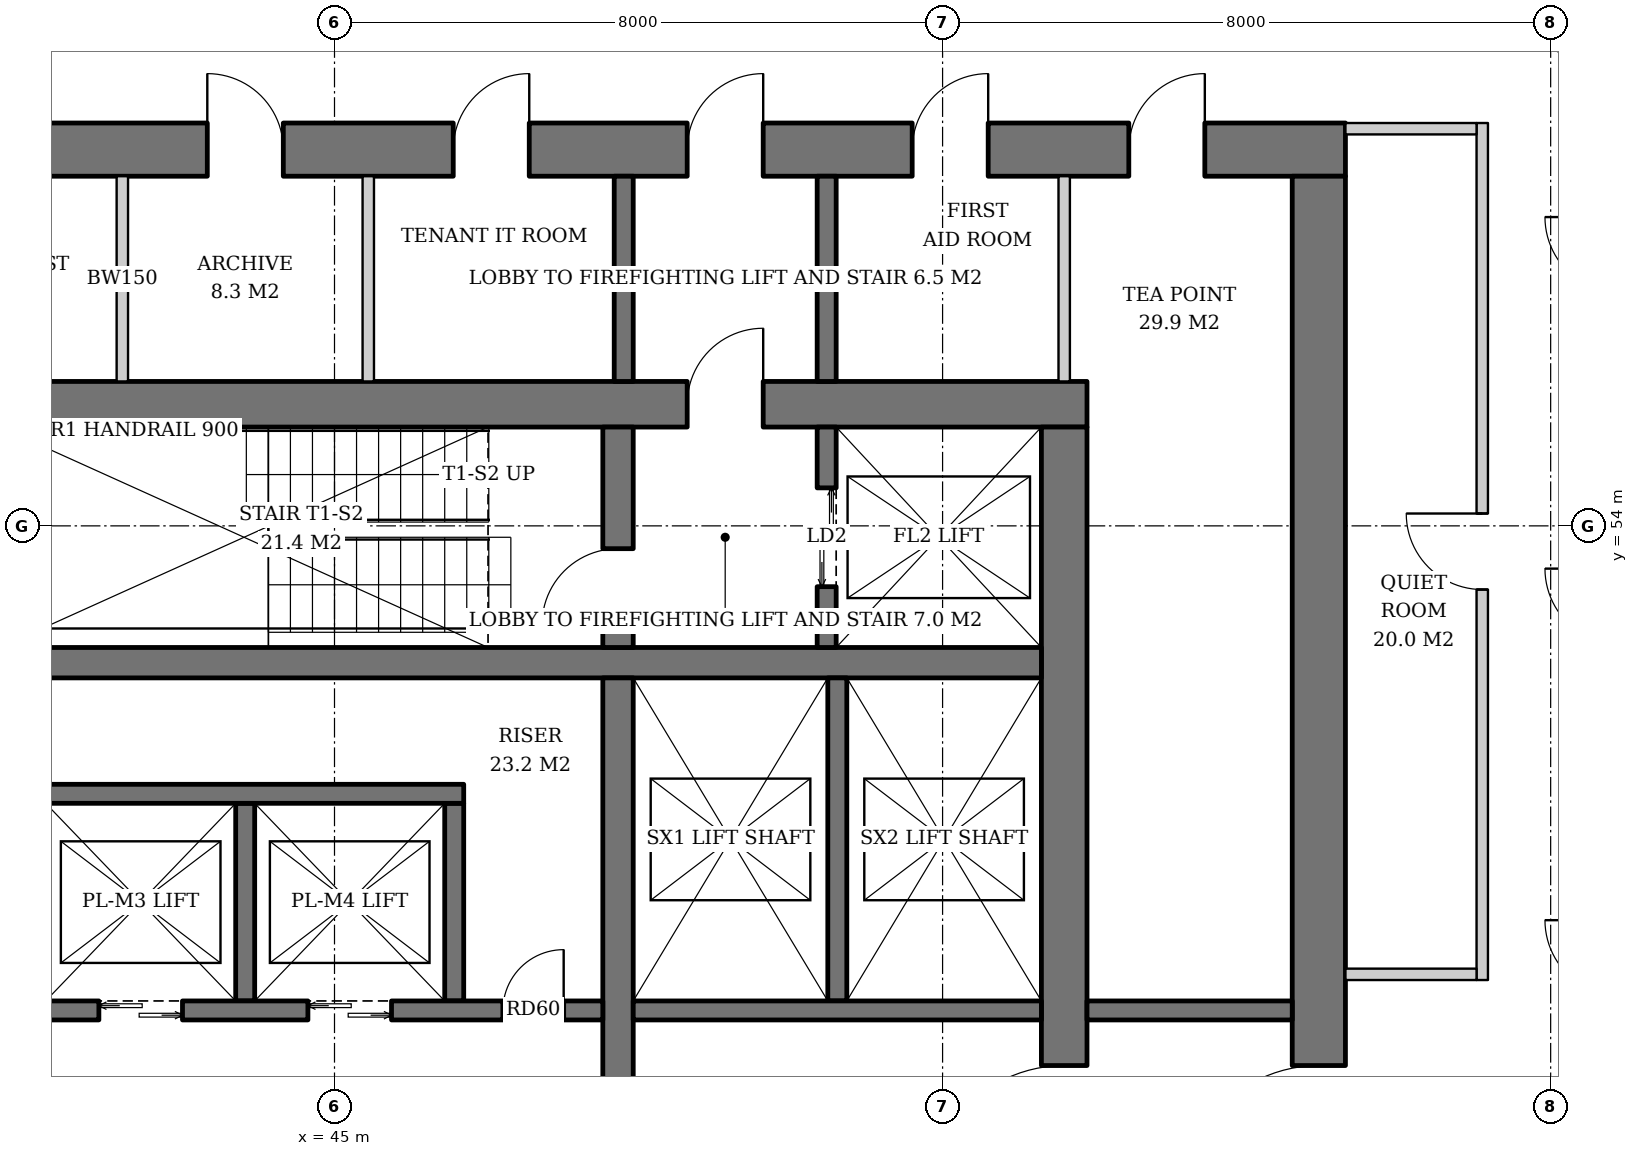
"""IFC4 building model, lengths in metres.
Left out: names, types, materials, properties, quantities, classifications, styles, units other than length and angle.
Written with IfcOpenShell. Run it as: python <this file> out.ifc"""

import sys

from ifc_helpers import new_model, si_unit, direction, frame, frame_2d, origin, origin_2d, place, context, subcontext, project, spatial, rectangle, extrude, element, fill, save


model = new_model("IFC4")
c1 = context("Model", 3, precision=1e-05, world=origin(), true_north=direction((0.0, 1.0)))
c2 = subcontext(c1, "Body", "Model", "MODEL_VIEW")
j1 = project(units=[si_unit("LENGTHUNIT", "METRE"), si_unit("PLANEANGLEUNIT", "RADIAN")], contexts=[c1])
p1 = place(None, origin())
s1 = spatial("IfcSite", under=j1, at=p1, CompositionType="ELEMENT")
p2 = place(p1, origin())
s2 = spatial("IfcBuilding", under=s1, at=p2, CompositionType="ELEMENT")
p3 = place(p2, frame((0.0, 0.0, 138.8)))
s3 = spatial("IfcBuildingStorey", under=s2, at=p3, CompositionType="ELEMENT", Elevation=138.8)
p4 = place(p3, frame((61.136, 62.136, 0.0), z_axis=(-0.031898107953, -0.031898107953, 0.998981992539), x_axis=(0.707106781187, -0.707106781187, 0.0)))
e1 = element("IfcColumn", 1, at=p4, inside=s3, PredefinedType="COLUMN", context=c2, shape_type="SweptSolid", body=[
    extrude(rectangle(XDim=2.6, YDim=2.6, at=origin_2d()), origin(), (0.0, 0.0, 1.0), 3.804),
])
p5 = place(p3, frame((35.1, 55.6, 0.0), z_axis=(0.0, 0.0, 1.0), x_axis=(1.0, 0.0, 0.0)))
e2 = element("IfcWall", 2, at=p5, inside=s3, PredefinedType="SHEAR", context=c2, shape_type="SweptSolid", body=[
    extrude(rectangle(XDim=19.8, YDim=0.6, at=frame_2d((9.9, 0.0))), origin(), (0.0, 0.0, 1.0), 3.8),
])
p6 = place(p5, frame((14.54, 0.0, 0.0)))
e3 = element("IfcOpeningElement", 3, at=p6, cuts=e2, PredefinedType="OPENING", context=c2, shape_type="SweptSolid", body=[
    extrude(rectangle(XDim=1.0, YDim=2.1, at=frame_2d((0.5, 1.05))), frame((0.0, 0.31, 0.0), z_axis=(0.0, -1.0, 0.0), x_axis=(1.0, 0.0, 0.0)), (0.0, 0.0, 1.0), 0.62),
])
p7 = place(p5, frame((2.425, 0.0, 0.0)))
e4 = element("IfcOpeningElement", 4, at=p7, cuts=e2, PredefinedType="OPENING", context=c2, shape_type="SweptSolid", body=[
    extrude(rectangle(XDim=1.0, YDim=2.1, at=frame_2d((0.5, 1.05))), frame((0.0, 0.31, 0.0), z_axis=(0.0, -1.0, 0.0), x_axis=(1.0, 0.0, 0.0)), (0.0, 0.0, 1.0), 0.62),
])
p8 = place(p3, frame((54.6, 36.7, 0.0), z_axis=(0.0, 0.0, 1.0), x_axis=(0.0, 1.0, 0.0)))
e5 = element("IfcWall", 5, at=p8, inside=s3, PredefinedType="SHEAR", context=c2, shape_type="SweptSolid", body=[
    extrude(rectangle(XDim=18.6, YDim=0.6, at=frame_2d((9.3, 0.0))), origin(), (0.0, 0.0, 1.0), 3.8),
])
p9 = place(p8, frame((8.4, 0.0, 0.0)))
e6 = element("IfcOpeningElement", 6, at=p9, cuts=e5, PredefinedType="OPENING", context=c2, shape_type="SweptSolid", body=[
    extrude(rectangle(XDim=1.8, YDim=2.4, at=frame_2d((0.9, 1.2))), frame((0.0, 0.31, 0.0), z_axis=(0.0, -1.0, 0.0), x_axis=(1.0, 0.0, 0.0)), (0.0, 0.0, 1.0), 0.62),
])
p10 = place(p3, frame((31.7, 58.95, 0.0), z_axis=(0.0, 0.0, 1.0), x_axis=(1.0, 0.0, 0.0)))
e7 = element("IfcWall", 7, at=p10, inside=s3, PredefinedType="SHEAR", context=c2, shape_type="SweptSolid", body=[
    extrude(rectangle(XDim=26.6, YDim=0.7, at=frame_2d((13.3, 0.0))), origin(), (0.0, 0.0, 1.0), 3.8),
])
p11 = place(p10, frame((17.94, 0.0, 0.0)))
e8 = element("IfcOpeningElement", 8, at=p11, cuts=e7, PredefinedType="OPENING", context=c2, shape_type="SweptSolid", body=[
    extrude(rectangle(XDim=1.0, YDim=2.1, at=frame_2d((0.5, 1.05))), frame((0.0, 0.36, 0.0), z_axis=(0.0, -1.0, 0.0), x_axis=(1.0, 0.0, 0.0)), (0.0, 0.0, 1.0), 0.72),
])
p12 = place(p10, frame((5.825, 0.0, 0.0)))
e9 = element("IfcOpeningElement", 9, at=p12, cuts=e7, PredefinedType="OPENING", context=c2, shape_type="SweptSolid", body=[
    extrude(rectangle(XDim=1.0, YDim=2.1, at=frame_2d((0.5, 1.05))), frame((0.0, 0.36, 0.0), z_axis=(0.0, -1.0, 0.0), x_axis=(1.0, 0.0, 0.0)), (0.0, 0.0, 1.0), 0.72),
])
p13 = place(p10, frame((1.85, 0.0, 0.0)))
e10 = element("IfcOpeningElement", 10, at=p13, cuts=e7, PredefinedType="OPENING", context=c2, shape_type="SweptSolid", body=[
    extrude(rectangle(XDim=1.0, YDim=2.1, at=frame_2d((0.5, 1.05))), frame((0.0, 0.36, 0.0), z_axis=(0.0, -1.0, 0.0), x_axis=(1.0, 0.0, 0.0)), (0.0, 0.0, 1.0), 0.72),
])
p14 = place(p10, frame((4.115, 0.0, 0.0)))
e11 = element("IfcOpeningElement", 11, at=p14, cuts=e7, PredefinedType="OPENING", context=c2, shape_type="SweptSolid", body=[
    extrude(rectangle(XDim=1.0, YDim=2.1, at=frame_2d((0.5, 1.05))), frame((0.0, 0.36, 0.0), z_axis=(0.0, -1.0, 0.0), x_axis=(1.0, 0.0, 0.0)), (0.0, 0.0, 1.0), 0.72),
])
p15 = place(p10, frame((8.342, 0.0, 0.0)))
e12 = element("IfcOpeningElement", 12, at=p15, cuts=e7, PredefinedType="OPENING", context=c2, shape_type="SweptSolid", body=[
    extrude(rectangle(XDim=1.0, YDim=2.1, at=frame_2d((0.5, 1.05))), frame((0.0, 0.36, 0.0), z_axis=(0.0, -1.0, 0.0), x_axis=(1.0, 0.0, 0.0)), (0.0, 0.0, 1.0), 0.72),
])
p16 = place(p10, frame((11.626, 0.0, 0.0)))
e13 = element("IfcOpeningElement", 13, at=p16, cuts=e7, PredefinedType="OPENING", context=c2, shape_type="SweptSolid", body=[
    extrude(rectangle(XDim=1.0, YDim=2.1, at=frame_2d((0.5, 1.05))), frame((0.0, 0.36, 0.0), z_axis=(0.0, -1.0, 0.0), x_axis=(1.0, 0.0, 0.0)), (0.0, 0.0, 1.0), 0.72),
])
p17 = place(p10, frame((14.862, 0.0, 0.0)))
e14 = element("IfcOpeningElement", 14, at=p17, cuts=e7, PredefinedType="OPENING", context=c2, shape_type="SweptSolid", body=[
    extrude(rectangle(XDim=1.0, YDim=2.1, at=frame_2d((0.5, 1.05))), frame((0.0, 0.36, 0.0), z_axis=(0.0, -1.0, 0.0), x_axis=(1.0, 0.0, 0.0)), (0.0, 0.0, 1.0), 0.72),
])
p18 = place(p10, frame((20.9, 0.0, 0.0)))
e15 = element("IfcOpeningElement", 15, at=p18, cuts=e7, PredefinedType="OPENING", context=c2, shape_type="SweptSolid", body=[
    extrude(rectangle(XDim=1.0, YDim=2.1, at=frame_2d((0.5, 1.05))), frame((0.0, 0.36, 0.0), z_axis=(0.0, -1.0, 0.0), x_axis=(1.0, 0.0, 0.0)), (0.0, 0.0, 1.0), 0.72),
])
p19 = place(p10, frame((23.75, 0.0, 0.0)))
e16 = element("IfcOpeningElement", 16, at=p19, cuts=e7, PredefinedType="OPENING", context=c2, shape_type="SweptSolid", body=[
    extrude(rectangle(XDim=1.0, YDim=2.1, at=frame_2d((0.5, 1.05))), frame((0.0, 0.36, 0.0), z_axis=(0.0, -1.0, 0.0), x_axis=(1.0, 0.0, 0.0)), (0.0, 0.0, 1.0), 0.72),
])
p20 = place(p3, frame((57.95, 33.4, 0.0), z_axis=(0.0, 0.0, 1.0), x_axis=(0.0, 1.0, 0.0)))
e17 = element("IfcWall", 17, at=p20, inside=s3, PredefinedType="SHEAR", context=c2, shape_type="SweptSolid", body=[
    extrude(rectangle(XDim=25.2, YDim=0.7, at=frame_2d((12.6, 0.0))), origin(), (0.0, 0.0, 1.0), 3.8),
])
p21 = place(p20, frame((11.7, 0.0, 0.0)))
e18 = element("IfcOpeningElement", 18, at=p21, cuts=e17, PredefinedType="OPENING", context=c2, shape_type="SweptSolid", body=[
    extrude(rectangle(XDim=1.8, YDim=2.4, at=frame_2d((0.9, 1.2))), frame((0.0, 0.36, 0.0), z_axis=(0.0, -1.0, 0.0), x_axis=(1.0, 0.0, 0.0)), (0.0, 0.0, 1.0), 0.72),
])
p22 = place(p3, frame((35.7, 52.2, 0.0), z_axis=(0.0, 0.0, 1.0), x_axis=(1.0, 0.0, 0.0)))
e19 = element("IfcWall", 19, at=p22, inside=s3, PredefinedType="SHEAR", context=c2, shape_type="SweptSolid", body=[
    extrude(rectangle(XDim=18.6, YDim=0.4, at=frame_2d((9.3, 0.0))), origin(), (0.0, 0.0, 1.0), 3.8),
])
p23 = place(p3, frame((48.73, 40.0, 0.0), z_axis=(0.0, 0.0, 1.0), x_axis=(0.0, 1.0, 0.0)))
e20 = element("IfcWall", 20, at=p23, inside=s3, PredefinedType="SHEAR", context=c2, shape_type="SweptSolid", body=[
    extrude(rectangle(XDim=12.0, YDim=0.4, at=frame_2d((6.0, 0.0))), origin(), (0.0, 0.0, 1.0), 3.8),
])
p24 = place(p3, frame((48.73, 52.4, 0.0), z_axis=(0.0, 0.0, 1.0), x_axis=(0.0, 1.0, 0.0)))
e21 = element("IfcWall", 21, at=p24, inside=s3, PredefinedType="SHEAR", context=c2, shape_type="SweptSolid", body=[
    extrude(rectangle(XDim=2.9, YDim=0.4, at=frame_2d((1.45, 0.0))), origin(), (0.0, 0.0, 1.0), 3.8),
])
p25 = place(p24, frame((0.3, 0.0, 0.0)))
e22 = element("IfcOpeningElement", 22, at=p25, cuts=e21, PredefinedType="OPENING", context=c2, shape_type="SweptSolid", body=[
    extrude(rectangle(XDim=1.0, YDim=2.1, at=frame_2d((0.5, 1.05))), frame((0.0, 0.21, 0.0), z_axis=(0.0, -1.0, 0.0), x_axis=(1.0, 0.0, 0.0)), (0.0, 0.0, 1.0), 0.42),
])
p26 = place(p3, frame((51.475, 52.4, 0.0), z_axis=(0.0, 0.0, 1.0), x_axis=(0.0, 1.0, 0.0)))
e23 = element("IfcWall", 23, at=p26, inside=s3, PredefinedType="SHEAR", context=c2, shape_type="SweptSolid", body=[
    extrude(rectangle(XDim=2.9, YDim=0.25, at=frame_2d((1.45, 0.0))), origin(), (0.0, 0.0, 1.0), 3.8),
])
p27 = place(p26, frame((0.8, 0.0, 0.0)))
e24 = element("IfcOpeningElement", 24, at=p27, cuts=e23, PredefinedType="OPENING", context=c2, shape_type="SweptSolid", body=[
    extrude(rectangle(XDim=1.3, YDim=2.2, at=frame_2d((0.65, 1.1))), frame((0.0, 0.135, 0.0), z_axis=(0.0, -1.0, 0.0), x_axis=(1.0, 0.0, 0.0)), (0.0, 0.0, 1.0), 0.27),
])
for number, where, z_axis, x_axis in (
    (25, (43.825, 47.75, 0.0), (0.0, 0.0, 1.0), (0.0, 1.0, 0.0)),
    (26, (46.575, 47.75, 0.0), (0.0, 0.0, 1.0), (0.0, 1.0, 0.0)),
):
    element("IfcWall", number, at=place(p3, frame(where, z_axis=z_axis, x_axis=x_axis)), inside=s3, PredefinedType="SHEAR", context=c2, shape_type="SweptSolid", body=[
        extrude(rectangle(XDim=2.6, YDim=0.25, at=frame_2d((1.3, 0.0))), origin(), (0.0, 0.0, 1.0), 3.8),
    ])
p28 = place(p3, frame((35.7, 50.475, 0.0), z_axis=(0.0, 0.0, 1.0), x_axis=(1.0, 0.0, 0.0)))
e27 = element("IfcWall", 27, at=p28, inside=s3, PredefinedType="SHEAR", context=c2, shape_type="SweptSolid", body=[
    extrude(rectangle(XDim=11.0, YDim=0.25, at=frame_2d((5.5, 0.0))), origin(), (0.0, 0.0, 1.0), 3.8),
])
p29 = place(p3, frame((35.7, 47.625, 0.0), z_axis=(0.0, 0.0, 1.0), x_axis=(1.0, 0.0, 0.0)))
e28 = element("IfcWall", 28, at=p29, inside=s3, PredefinedType="SHEAR", context=c2, shape_type="SweptSolid", body=[
    extrude(rectangle(XDim=12.83, YDim=0.25, at=frame_2d((6.415, 0.0))), origin(), (0.0, 0.0, 1.0), 3.8),
])
p30 = place(p29, frame((0.7, 0.0, 0.0)))
e29 = element("IfcOpeningElement", 29, at=p30, cuts=e28, PredefinedType="OPENING", context=c2, shape_type="SweptSolid", body=[
    extrude(rectangle(XDim=1.1, YDim=2.2, at=frame_2d((0.55, 1.1))), frame((0.0, 0.135, 0.0), z_axis=(0.0, -1.0, 0.0), x_axis=(1.0, 0.0, 0.0)), (0.0, 0.0, 1.0), 0.27),
])
p31 = place(p29, frame((3.45, 0.0, 0.0)))
e30 = element("IfcOpeningElement", 30, at=p31, cuts=e28, PredefinedType="OPENING", context=c2, shape_type="SweptSolid", body=[
    extrude(rectangle(XDim=1.1, YDim=2.2, at=frame_2d((0.55, 1.1))), frame((0.0, 0.135, 0.0), z_axis=(0.0, -1.0, 0.0), x_axis=(1.0, 0.0, 0.0)), (0.0, 0.0, 1.0), 0.27),
])
p32 = place(p29, frame((6.2, 0.0, 0.0)))
e31 = element("IfcOpeningElement", 31, at=p32, cuts=e28, PredefinedType="OPENING", context=c2, shape_type="SweptSolid", body=[
    extrude(rectangle(XDim=1.1, YDim=2.2, at=frame_2d((0.55, 1.1))), frame((0.0, 0.135, 0.0), z_axis=(0.0, -1.0, 0.0), x_axis=(1.0, 0.0, 0.0)), (0.0, 0.0, 1.0), 0.27),
])
p33 = place(p29, frame((8.95, 0.0, 0.0)))
e32 = element("IfcOpeningElement", 32, at=p33, cuts=e28, PredefinedType="OPENING", context=c2, shape_type="SweptSolid", body=[
    extrude(rectangle(XDim=1.1, YDim=2.2, at=frame_2d((0.55, 1.1))), frame((0.0, 0.135, 0.0), z_axis=(0.0, -1.0, 0.0), x_axis=(1.0, 0.0, 0.0)), (0.0, 0.0, 1.0), 0.27),
])
p34 = place(p29, frame((11.515, 0.0, 0.0)))
e33 = element("IfcOpeningElement", 33, at=p34, cuts=e28, PredefinedType="OPENING", context=c2, shape_type="SweptSolid", body=[
    extrude(rectangle(XDim=0.8, YDim=2.0, at=frame_2d((0.4, 1.0))), frame((0.0, 0.135, 0.0), z_axis=(0.0, -1.0, 0.0), x_axis=(1.0, 0.0, 0.0)), (0.0, 0.0, 1.0), 0.27),
])
p35 = place(p3, frame((51.615, 47.75, 0.0), z_axis=(0.0, 0.0, 1.0), x_axis=(0.0, 1.0, 0.0)))
e34 = element("IfcWall", 34, at=p35, inside=s3, PredefinedType="SHEAR", context=c2, shape_type="SweptSolid", body=[
    extrude(rectangle(XDim=4.25, YDim=0.25, at=frame_2d((2.125, 0.0))), origin(), (0.0, 0.0, 1.0), 3.8),
])
p36 = place(p3, frame((48.93, 47.625, 0.0), z_axis=(0.0, 0.0, 1.0), x_axis=(1.0, 0.0, 0.0)))
e35 = element("IfcWall", 35, at=p36, inside=s3, PredefinedType="SHEAR", context=c2, shape_type="SweptSolid", body=[
    extrude(rectangle(XDim=5.37, YDim=0.25, at=frame_2d((2.685, 0.0))), origin(), (0.0, 0.0, 1.0), 3.8),
])
for number, where, z_axis, x_axis in (
    (36, (48.805, 55.9, 0.0), (0.0, 0.0, 1.0), (0.0, 1.0, 0.0)),
    (37, (51.475, 55.9, 0.0), (0.0, 0.0, 1.0), (0.0, 1.0, 0.0)),
    (38, (54.9, 47.625, 0.0), (0.0, 0.0, 1.0), (1.0, 0.0, 0.0)),
):
    element("IfcWall", number, at=place(p3, frame(where, z_axis=z_axis, x_axis=x_axis)), inside=s3, PredefinedType="SOLIDWALL", context=c2, shape_type="SweptSolid", body=[
        extrude(rectangle(XDim=2.7, YDim=0.25, at=frame_2d((1.35, 0.0))), origin(), (0.0, 0.0, 1.0), 3.62),
    ])
for number, where, z_axis, x_axis in (
    (39, (42.209, 55.9, 0.0), (0.0, 0.0, 1.0), (0.0, 1.0, 0.0)),
    (40, (45.444, 55.9, 0.0), (0.0, 0.0, 1.0), (0.0, 1.0, 0.0)),
    (41, (54.6, 55.9, 0.0), (0.0, 0.0, 1.0), (0.0, 1.0, 0.0)),
):
    element("IfcWall", number, at=place(p3, frame(where, z_axis=z_axis, x_axis=x_axis)), inside=s3, PredefinedType="SOLIDWALL", context=c2, shape_type="SweptSolid", body=[
        extrude(rectangle(XDim=2.7, YDim=0.15, at=frame_2d((1.35, 0.0))), origin(), (0.0, 0.0, 1.0), 3.62),
    ])
p37 = place(p3, frame((60.1, 48.025, 0.0), z_axis=(0.0, 0.0, 1.0), x_axis=(0.0, 1.0, 0.0)))
e42 = element("IfcWall", 42, at=p37, inside=s3, PredefinedType="PARTITIONING", context=c2, shape_type="SweptSolid", body=[
    extrude(rectangle(XDim=11.275, YDim=0.15, at=frame_2d((5.638, 0.0))), origin(), (0.0, 0.0, 1.0), 2.806),
])
p38 = place(p37, frame((5.137, 0.0, 0.0)))
e43 = element("IfcOpeningElement", 43, at=p38, cuts=e42, PredefinedType="OPENING", context=c2, shape_type="SweptSolid", body=[
    extrude(rectangle(XDim=1.0, YDim=2.1, at=frame_2d((0.5, 1.05))), frame((0.0, 0.085, 0.0), z_axis=(0.0, -1.0, 0.0), x_axis=(1.0, 0.0, 0.0)), (0.0, 0.0, 1.0), 0.17),
])
for number, where, z_axis, x_axis in (
    (44, (58.3, 48.1, 0.0), (0.0, 0.0, 1.0), (1.0, 0.0, 0.0)),
    (45, (58.3, 59.225, 0.0), (0.0, 0.0, 1.0), (1.0, 0.0, 0.0)),
):
    element("IfcWall", number, at=place(p3, frame(where, z_axis=z_axis, x_axis=x_axis)), inside=s3, PredefinedType="PARTITIONING", context=c2, shape_type="SweptSolid", body=[
        extrude(rectangle(XDim=1.725, YDim=0.15, at=frame_2d((0.862, 0.0))), origin(), (0.0, 0.0, 1.0), 3.62),
    ])
p39 = place(p27, origin())
e46 = element("IfcDoor", 46, at=p39, inside=s3, OperationType="DOUBLE_DOOR_SLIDING", PredefinedType="DOOR", context=c2, shape_type="SweptSolid", body=[
    extrude(rectangle(XDim=1.3, YDim=2.2, at=frame_2d((0.65, 1.1))), frame((0.0, 0.025, 0.0), z_axis=(0.0, -1.0, 0.0), x_axis=(1.0, 0.0, 0.0)), (0.0, 0.0, 1.0), 0.05),
])
fill(e24, e46)
p40 = place(p32, origin())
e47 = element("IfcDoor", 47, at=p40, inside=s3, OperationType="DOUBLE_DOOR_SLIDING", PredefinedType="DOOR", context=c2, shape_type="SweptSolid", body=[
    extrude(rectangle(XDim=1.1, YDim=2.2, at=frame_2d((0.55, 1.1))), frame((0.0, 0.025, 0.0), z_axis=(0.0, -1.0, 0.0), x_axis=(1.0, 0.0, 0.0)), (0.0, 0.0, 1.0), 0.05),
])
fill(e31, e47)
p41 = place(p33, origin())
e48 = element("IfcDoor", 48, at=p41, inside=s3, OperationType="DOUBLE_DOOR_SLIDING", PredefinedType="DOOR", context=c2, shape_type="SweptSolid", body=[
    extrude(rectangle(XDim=1.1, YDim=2.2, at=frame_2d((0.55, 1.1))), frame((0.0, 0.025, 0.0), z_axis=(0.0, -1.0, 0.0), x_axis=(1.0, 0.0, 0.0)), (0.0, 0.0, 1.0), 0.05),
])
fill(e32, e48)
p42 = place(p34, origin())
e49 = element("IfcDoor", 49, at=p42, inside=s3, OperationType="SINGLE_SWING_RIGHT", PredefinedType="DOOR", context=c2, shape_type="SweptSolid", body=[
    extrude(rectangle(XDim=0.8, YDim=2.0, at=frame_2d((0.4, 1.0))), frame((0.0, 0.025, 0.0), z_axis=(0.0, -1.0, 0.0), x_axis=(1.0, 0.0, 0.0)), (0.0, 0.0, 1.0), 0.05),
])
fill(e33, e49)
p43 = place(p25, origin())
e50 = element("IfcDoor", 50, at=p43, inside=s3, OperationType="SINGLE_SWING_LEFT", PredefinedType="DOOR", context=c2, shape_type="SweptSolid", body=[
    extrude(rectangle(XDim=1.0, YDim=2.1, at=frame_2d((0.5, 1.05))), frame((0.0, 0.025, 0.0), z_axis=(0.0, -1.0, 0.0), x_axis=(1.0, 0.0, 0.0)), (0.0, 0.0, 1.0), 0.05),
])
fill(e22, e50)
p44 = place(p6, origin())
e51 = element("IfcDoor", 51, at=p44, inside=s3, OperationType="SINGLE_SWING_RIGHT", PredefinedType="DOOR", context=c2, shape_type="SweptSolid", body=[
    extrude(rectangle(XDim=1.0, YDim=2.1, at=frame_2d((0.5, 1.05))), frame((0.0, 0.025, 0.0), z_axis=(0.0, -1.0, 0.0), x_axis=(1.0, 0.0, 0.0)), (0.0, 0.0, 1.0), 0.05),
])
fill(e3, e51)
p45 = place(p9, origin())
e52 = element("IfcDoor", 52, at=p45, inside=s3, OperationType="DOUBLE_DOOR_SINGLE_SWING", PredefinedType="DOOR", context=c2, shape_type="SweptSolid", body=[
    extrude(rectangle(XDim=1.8, YDim=2.4, at=frame_2d((0.9, 1.2))), frame((0.0, 0.025, 0.0), z_axis=(0.0, -1.0, 0.0), x_axis=(1.0, 0.0, 0.0)), (0.0, 0.0, 1.0), 0.05),
])
fill(e6, e52)
p46 = place(p21, origin())
e53 = element("IfcDoor", 53, at=p46, inside=s3, OperationType="DOUBLE_DOOR_SINGLE_SWING", PredefinedType="DOOR", context=c2, shape_type="SweptSolid", body=[
    extrude(rectangle(XDim=1.8, YDim=2.4, at=frame_2d((0.9, 1.2))), frame((0.0, 0.025, 0.0), z_axis=(0.0, -1.0, 0.0), x_axis=(1.0, 0.0, 0.0)), (0.0, 0.0, 1.0), 0.05),
])
fill(e18, e53)
p47 = place(p11, origin())
e54 = element("IfcDoor", 54, at=p47, inside=s3, OperationType="SINGLE_SWING_RIGHT", PredefinedType="DOOR", context=c2, shape_type="SweptSolid", body=[
    extrude(rectangle(XDim=1.0, YDim=2.1, at=frame_2d((0.5, 1.05))), frame((0.0, 0.025, 0.0), z_axis=(0.0, -1.0, 0.0), x_axis=(1.0, 0.0, 0.0)), (0.0, 0.0, 1.0), 0.05),
])
fill(e8, e54)
p48 = place(p16, origin())
e55 = element("IfcDoor", 55, at=p48, inside=s3, OperationType="SINGLE_SWING_LEFT", PredefinedType="DOOR", context=c2, shape_type="SweptSolid", body=[
    extrude(rectangle(XDim=1.0, YDim=2.1, at=frame_2d((0.5, 1.05))), frame((0.0, -0.29, 0.0), z_axis=(0.0, -1.0, 0.0), x_axis=(1.0, 0.0, 0.0)), (0.0, 0.0, 1.0), 0.05),
])
fill(e13, e55)
p49 = place(p17, origin())
e56 = element("IfcDoor", 56, at=p49, inside=s3, OperationType="SINGLE_SWING_RIGHT", PredefinedType="DOOR", context=c2, shape_type="SweptSolid", body=[
    extrude(rectangle(XDim=1.0, YDim=2.1, at=frame_2d((0.5, 1.05))), frame((0.0, -0.29, 0.0), z_axis=(0.0, -1.0, 0.0), x_axis=(1.0, 0.0, 0.0)), (0.0, 0.0, 1.0), 0.05),
])
fill(e14, e56)
p50 = place(p18, origin())
e57 = element("IfcDoor", 57, at=p50, inside=s3, OperationType="SINGLE_SWING_RIGHT", PredefinedType="DOOR", context=c2, shape_type="SweptSolid", body=[
    extrude(rectangle(XDim=1.0, YDim=2.1, at=frame_2d((0.5, 1.05))), frame((0.0, -0.29, 0.0), z_axis=(0.0, -1.0, 0.0), x_axis=(1.0, 0.0, 0.0)), (0.0, 0.0, 1.0), 0.05),
])
fill(e15, e57)
p51 = place(p19, origin())
e58 = element("IfcDoor", 58, at=p51, inside=s3, OperationType="SINGLE_SWING_RIGHT", PredefinedType="DOOR", context=c2, shape_type="SweptSolid", body=[
    extrude(rectangle(XDim=1.0, YDim=2.1, at=frame_2d((0.5, 1.05))), frame((0.0, -0.29, 0.0), z_axis=(0.0, -1.0, 0.0), x_axis=(1.0, 0.0, 0.0)), (0.0, 0.0, 1.0), 0.05),
])
fill(e16, e58)
p52 = place(p38, origin())
e59 = element("IfcDoor", 59, at=p52, inside=s3, OperationType="SINGLE_SWING_RIGHT", PredefinedType="DOOR", context=c2, shape_type="SweptSolid", body=[
    extrude(rectangle(XDim=1.0, YDim=2.1, at=frame_2d((0.5, 1.05))), frame((0.0, 0.025, 0.0), z_axis=(0.0, -1.0, 0.0), x_axis=(1.0, 0.0, 0.0)), (0.0, 0.0, 1.0), 0.05),
])
fill(e43, e59)
save(model, sys.argv[1])
